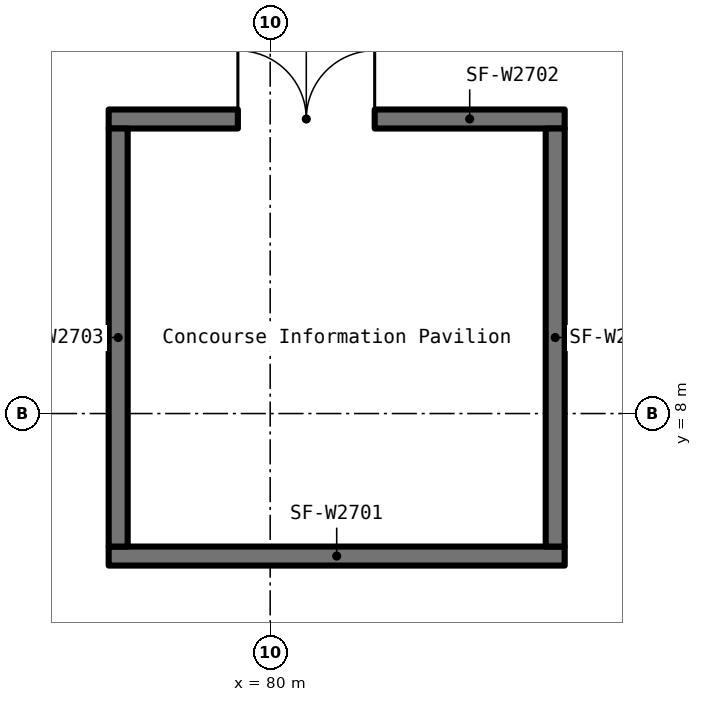
"""IFC4 building model, lengths in metres.
Left out: names, types, materials, properties, quantities, classifications, styles, units other than length and angle.
Written with IfcOpenShell. Run it as: python <this file> out.ifc"""

import sys

from ifc_helpers import new_model, si_unit, direction, frame, frame_2d, origin, place, context, subcontext, project, spatial, rectangle, extrude, element, fill, save


model = new_model("IFC4")
c1 = context("Model", 3, precision=1e-05, world=origin(), true_north=direction((0.0, 1.0)))
c2 = subcontext(c1, "Body", "Model", "MODEL_VIEW")
j1 = project(units=[si_unit("LENGTHUNIT", "METRE"), si_unit("PLANEANGLEUNIT", "RADIAN")], contexts=[c1])
p1 = place(None, origin())
s1 = spatial("IfcSite", under=j1, at=p1, CompositionType="ELEMENT")
p2 = place(p1, origin())
s2 = spatial("IfcBuilding", under=s1, at=p2, CompositionType="ELEMENT")
p3 = place(p2, origin())
s3 = spatial("IfcBuildingStorey", under=s2, at=p3, CompositionType="ELEMENT", Elevation=0.0)
p4 = place(p3, frame((77.875, 6.125, 0.0), z_axis=(0.0, 0.0, 1.0), x_axis=(1.0, 0.0, 0.0)))
e1 = element("IfcWall", 1, at=p4, inside=s3, PredefinedType="SOLIDWALL", context=c2, shape_type="SweptSolid", body=[
    extrude(rectangle(XDim=6.0, YDim=0.25, at=frame_2d((3.0, 0.0))), origin(), (0.0, 0.0, 1.0), 3.2),
])
p5 = place(p3, frame((77.875, 11.875, 0.0), z_axis=(0.0, 0.0, 1.0), x_axis=(1.0, 0.0, 0.0)))
e2 = element("IfcWall", 2, at=p5, inside=s3, PredefinedType="SOLIDWALL", context=c2, shape_type="SweptSolid", body=[
    extrude(rectangle(XDim=6.0, YDim=0.25, at=frame_2d((3.0, 0.0))), origin(), (0.0, 0.0, 1.0), 3.2),
])
p6 = place(p5, frame((1.7, 0.0, 0.0)))
e3 = element("IfcOpeningElement", 3, at=p6, cuts=e2, PredefinedType="OPENING", context=c2, shape_type="SweptSolid", body=[
    extrude(rectangle(XDim=1.8, YDim=2.1, at=frame_2d((0.9, 1.05))), frame((0.0, 0.137, 0.0), z_axis=(0.0, -1.0, 0.0), x_axis=(1.0, 0.0, 0.0)), (0.0, 0.0, 1.0), 0.274),
])
for number, where, z_axis, x_axis in (
    (4, (78.0, 6.25, 0.0), (0.0, 0.0, 1.0), (0.0, 1.0, 0.0)),
    (5, (83.75, 6.25, 0.0), (0.0, 0.0, 1.0), (0.0, 1.0, 0.0)),
):
    element("IfcWall", number, at=place(p3, frame(where, z_axis=z_axis, x_axis=x_axis)), inside=s3, PredefinedType="SOLIDWALL", context=c2, shape_type="SweptSolid", body=[
        extrude(rectangle(XDim=5.5, YDim=0.25, at=frame_2d((2.75, 0.0))), origin(), (0.0, 0.0, 1.0), 3.2),
    ])
p7 = place(p6, origin())
e6 = element("IfcDoor", 6, at=p7, inside=s3, OperationType="DOUBLE_DOOR_DOUBLE_SWING", PredefinedType="DOOR", context=c2, shape_type="SweptSolid", body=[
    extrude(rectangle(XDim=1.8, YDim=2.1, at=frame_2d((0.9, 1.05))), frame((0.0, 0.025, 0.0), z_axis=(0.0, -1.0, 0.0), x_axis=(1.0, 0.0, 0.0)), (0.0, 0.0, 1.0), 0.05),
])
fill(e3, e6)
save(model, sys.argv[1])
